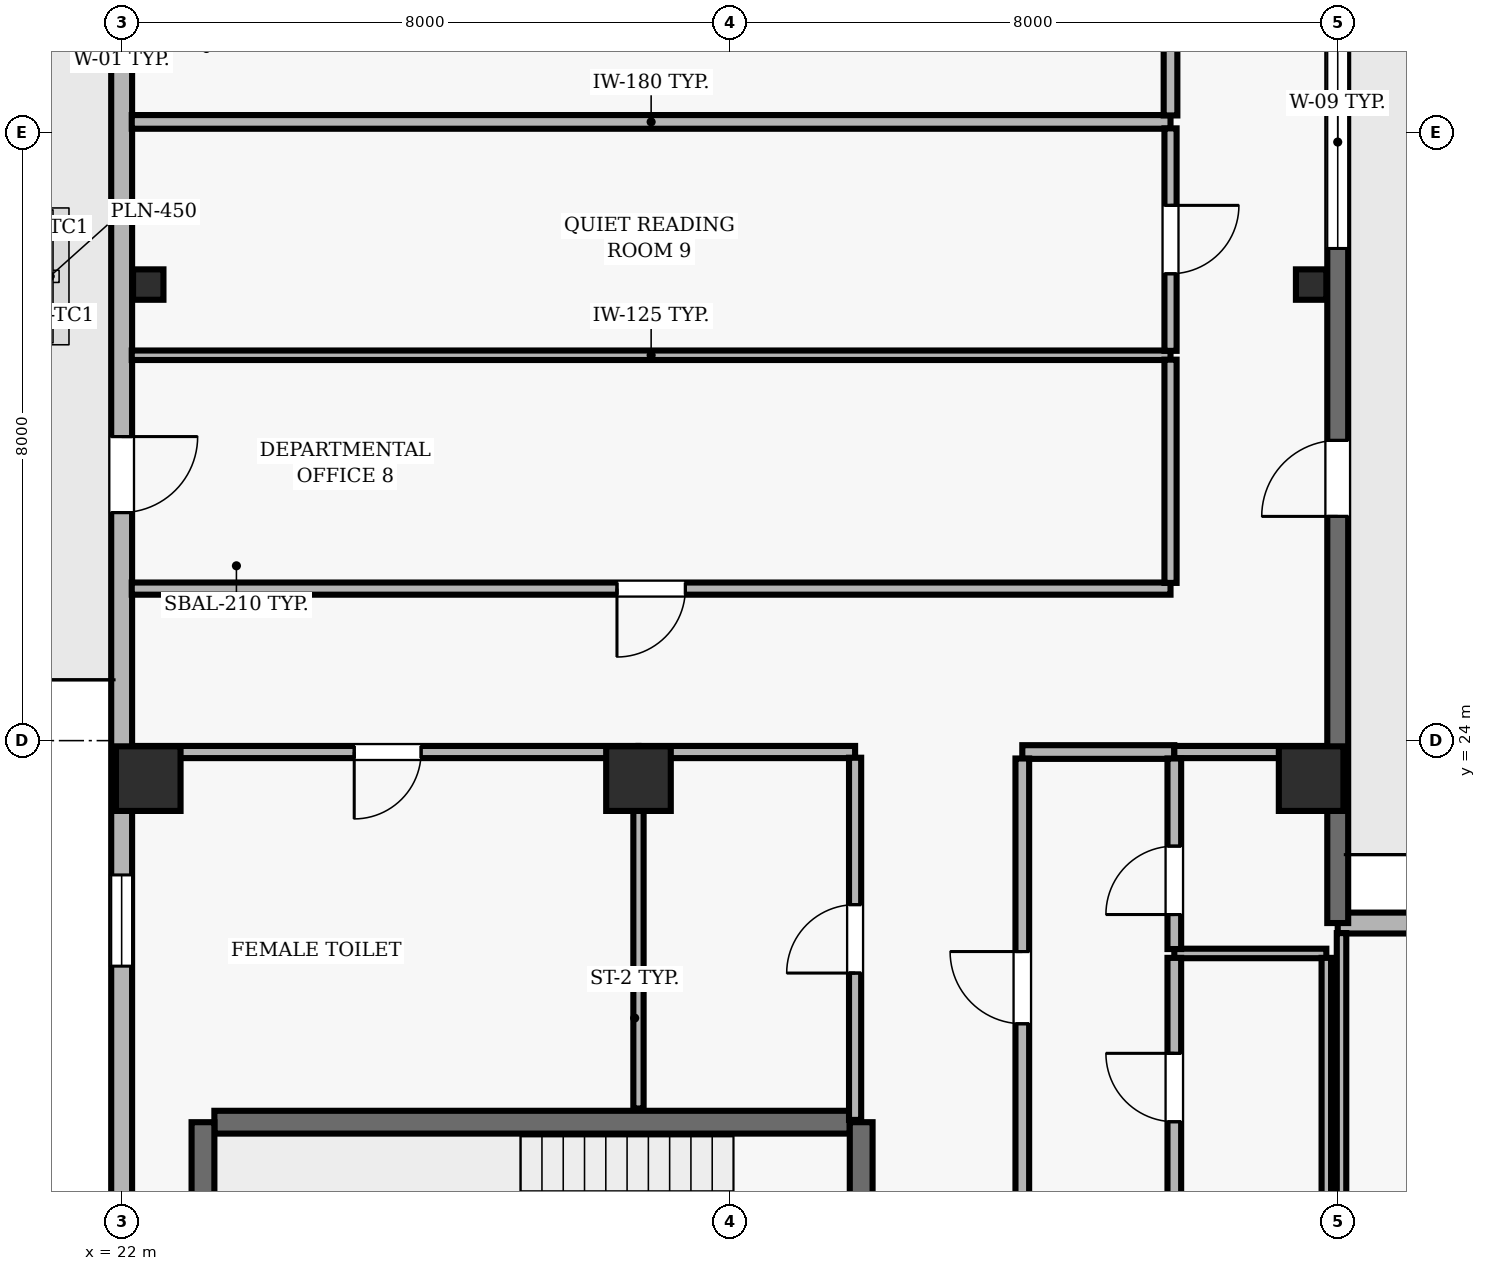
"""IFC4 building model, lengths in metres.
Left out: names, types, materials, properties, quantities, classifications, styles, units other than length and angle.
Written with IfcOpenShell. Run it as: python <this file> out.ifc"""

import sys

from ifc_helpers import new_model, si_unit, direction, frame, frame_2d, origin, origin_2d, place, context, subcontext, project, spatial, rectangle, hollow_rectangle, extrude, element, fill, save


model = new_model("IFC4")
c1 = context("Model", 3, precision=1e-05, world=origin(), true_north=direction((0.0, 1.0)))
c2 = subcontext(c1, "Body", "Model", "MODEL_VIEW")
j1 = project(units=[si_unit("LENGTHUNIT", "METRE"), si_unit("PLANEANGLEUNIT", "RADIAN")], contexts=[c1])
p1 = place(None, origin())
s1 = spatial("IfcSite", under=j1, at=p1, CompositionType="ELEMENT")
p2 = place(p1, origin())
s2 = spatial("IfcBuilding", under=s1, at=p2, CompositionType="ELEMENT")
p3 = place(p2, frame((0.0, 0.0, 295.0)))
s3 = spatial("IfcBuildingStorey", under=s2, at=p3, CompositionType="ELEMENT", Elevation=295.0)
for number, where, z_axis, x_axis in (
    (1, (22.35, 23.5, 0.0), (0.0, 0.0, 1.0), (1.0, 0.0, 0.0)),
    (2, (28.8, 23.5, 0.0), (0.0, 0.0, 1.0), (1.0, 0.0, 0.0)),
    (3, (37.65, 23.5, 0.0), (0.0, 0.0, 1.0), (1.0, 0.0, 0.0)),
):
    element("IfcColumn", number, at=place(p3, frame(where, z_axis=z_axis, x_axis=x_axis)), inside=s3, PredefinedType="COLUMN", context=c2, shape_type="SweptSolid", body=[
        extrude(rectangle(XDim=0.85, YDim=0.85, at=origin_2d()), origin(), (0.0, 0.0, 1.0), 3.9),
    ])
for number, where, z_axis, x_axis in (
    (4, (22.35, 30.0, 0.0), (0.0, 0.0, 1.0), (1.0, 0.0, 0.0)),
    (5, (37.65, 30.0, 0.0), (0.0, 0.0, 1.0), (1.0, 0.0, 0.0)),
):
    element("IfcColumn", number, at=place(p3, frame(where, z_axis=z_axis, x_axis=x_axis)), inside=s3, PredefinedType="COLUMN", context=c2, shape_type="SweptSolid", body=[
        extrude(hollow_rectangle(XDim=0.4, YDim=0.4, WallThickness=0.02, at=origin_2d()), origin(), (0.0, 0.0, 1.0), 3.9),
    ])
p4 = place(p3, frame((43.0, 21.6, 0.0), z_axis=(0.0, 0.0, 1.0), x_axis=(-1.0, 0.0, 0.0)))
e6 = element("IfcWall", 6, at=p4, inside=s3, PredefinedType="SOLIDWALL", context=c2, shape_type="SweptSolid", body=[
    extrude(rectangle(XDim=5.0, YDim=0.275, at=frame_2d((2.5, 0.0))), origin(), (0.0, 0.0, 1.0), 3.69),
])
p5 = place(p3, frame((38.0, 21.6, 0.0), z_axis=(0.0, 0.0, 1.0), x_axis=(0.0, 1.0, 0.0)))
e7 = element("IfcWall", 7, at=p5, inside=s3, PredefinedType="SOLIDWALL", context=c2, shape_type="SweptSolid", body=[
    extrude(rectangle(XDim=13.7, YDim=0.275, at=frame_2d((6.85, 0.0))), origin(), (0.0, 0.0, 1.0), 3.69),
])
p6 = place(p5, frame((5.35, 0.0, 0.0)))
e8 = element("IfcOpeningElement", 8, at=p6, cuts=e7, PredefinedType="OPENING", context=c2, shape_type="SweptSolid", body=[
    extrude(rectangle(XDim=1.0, YDim=2.2, at=frame_2d((0.5, 1.1))), frame((0.0, 0.147, 0.0), z_axis=(0.0, -1.0, 0.0), x_axis=(1.0, 0.0, 0.0)), (0.0, 0.0, 1.0), 0.295),
])
p7 = place(p5, frame((8.875, 0.0, 0.9)))
e9 = element("IfcOpeningElement", 9, at=p7, cuts=e7, PredefinedType="OPENING", context=c2, shape_type="SweptSolid", body=[
    extrude(rectangle(XDim=2.8, YDim=1.8, at=frame_2d((1.4, 0.9))), frame((0.0, 0.147, 0.0), z_axis=(0.0, -1.0, 0.0), x_axis=(1.0, 0.0, 0.0)), (0.0, 0.0, 1.0), 0.295),
])
p8 = place(p3, frame((22.0, 35.3, 0.0), z_axis=(0.0, 0.0, 1.0), x_axis=(0.0, -1.0, 0.0)))
e10 = element("IfcWall", 10, at=p8, inside=s3, PredefinedType="SOLIDWALL", context=c2, shape_type="SweptSolid", body=[
    extrude(rectangle(XDim=32.8, YDim=0.275, at=frame_2d((16.4, 0.0))), origin(), (0.0, 0.0, 1.0), 3.69),
])
p9 = place(p8, frame((7.3, 0.0, 0.0)))
e11 = element("IfcOpeningElement", 11, at=p9, cuts=e10, PredefinedType="OPENING", context=c2, shape_type="SweptSolid", body=[
    extrude(rectangle(XDim=1.0, YDim=2.2, at=frame_2d((0.5, 1.1))), frame((0.0, 0.147, 0.0), z_axis=(0.0, -1.0, 0.0), x_axis=(1.0, 0.0, 0.0)), (0.0, 0.0, 1.0), 0.295),
])
p10 = place(p8, frame((1.233, 0.0, 0.9)))
e12 = element("IfcOpeningElement", 12, at=p10, cuts=e10, PredefinedType="OPENING", context=c2, shape_type="SweptSolid", body=[
    extrude(rectangle(XDim=1.2, YDim=1.6, at=frame_2d((0.6, 0.8))), frame((0.0, 0.147, 0.0), z_axis=(0.0, -1.0, 0.0), x_axis=(1.0, 0.0, 0.0)), (0.0, 0.0, 1.0), 0.295),
])
p11 = place(p8, frame((13.067, 0.0, 0.9)))
e13 = element("IfcOpeningElement", 13, at=p11, cuts=e10, PredefinedType="OPENING", context=c2, shape_type="SweptSolid", body=[
    extrude(rectangle(XDim=1.2, YDim=1.6, at=frame_2d((0.6, 0.8))), frame((0.0, 0.147, 0.0), z_axis=(0.0, -1.0, 0.0), x_axis=(1.0, 0.0, 0.0)), (0.0, 0.0, 1.0), 0.295),
])
p12 = place(p8, frame((18.533, 0.0, 0.9)))
e14 = element("IfcOpeningElement", 14, at=p12, cuts=e10, PredefinedType="OPENING", context=c2, shape_type="SweptSolid", body=[
    extrude(rectangle(XDim=1.2, YDim=1.6, at=frame_2d((0.6, 0.8))), frame((0.0, 0.147, 0.0), z_axis=(0.0, -1.0, 0.0), x_axis=(1.0, 0.0, 0.0)), (0.0, 0.0, 1.0), 0.295),
])
p13 = place(p8, frame((24.0, 0.0, 0.9)))
e15 = element("IfcOpeningElement", 15, at=p13, cuts=e10, PredefinedType="OPENING", context=c2, shape_type="SweptSolid", body=[
    extrude(rectangle(XDim=1.2, YDim=1.6, at=frame_2d((0.6, 0.8))), frame((0.0, 0.147, 0.0), z_axis=(0.0, -1.0, 0.0), x_axis=(1.0, 0.0, 0.0)), (0.0, 0.0, 1.0), 0.295),
])
p14 = place(p8, frame((28.567, 0.0, 0.9)))
e16 = element("IfcOpeningElement", 16, at=p14, cuts=e10, PredefinedType="OPENING", context=c2, shape_type="SweptSolid", body=[
    extrude(rectangle(XDim=1.2, YDim=1.6, at=frame_2d((0.6, 0.8))), frame((0.0, 0.147, 0.0), z_axis=(0.0, -1.0, 0.0), x_axis=(1.0, 0.0, 0.0)), (0.0, 0.0, 1.0), 0.295),
])
p15 = place(p3, frame((31.58, 18.98, 0.0), z_axis=(0.0, 0.0, 1.0), x_axis=(-1.0, 0.0, 0.0)))
e17 = element("IfcWall", 17, at=p15, inside=s3, PredefinedType="SHEAR", context=c2, shape_type="SweptSolid", body=[
    extrude(rectangle(XDim=8.36, YDim=0.3, at=frame_2d((4.18, 0.0))), origin(), (0.0, 0.0, 1.0), 3.69),
])
p16 = place(p3, frame((23.07, 18.98, 0.0), z_axis=(0.0, 0.0, 1.0), x_axis=(0.0, -1.0, 0.0)))
e18 = element("IfcWall", 18, at=p16, inside=s3, PredefinedType="SHEAR", context=c2, shape_type="SweptSolid", body=[
    extrude(rectangle(XDim=3.51, YDim=0.3, at=frame_2d((1.755, 0.0))), origin(), (0.0, 0.0, 1.0), 3.69),
])
p17 = place(p3, frame((31.73, 15.47, 0.0), z_axis=(0.0, 0.0, 1.0), x_axis=(0.0, 1.0, 0.0)))
e19 = element("IfcWall", 19, at=p17, inside=s3, PredefinedType="SHEAR", context=c2, shape_type="SweptSolid", body=[
    extrude(rectangle(XDim=3.51, YDim=0.3, at=frame_2d((1.755, 0.0))), origin(), (0.0, 0.0, 1.0), 3.69),
])
p18 = place(p17, frame((1.18, 0.0, 0.0)))
e20 = element("IfcOpeningElement", 20, at=p18, cuts=e19, PredefinedType="OPENING", context=c2, shape_type="SweptSolid", body=[
    extrude(rectangle(XDim=1.15, YDim=2.15, at=frame_2d((0.575, 1.075))), frame((0.0, 0.16, 0.0), z_axis=(0.0, -1.0, 0.0), x_axis=(1.0, 0.0, 0.0)), (0.0, 0.0, 1.0), 0.32),
])
p19 = place(p3, frame((28.8, 23.85, 0.0), z_axis=(0.0, 0.0, 1.0), x_axis=(-1.0, 0.0, 0.0)))
e21 = element("IfcWall", 21, at=p19, inside=s3, PredefinedType="PARTITIONING", context=c2, shape_type="SweptSolid", body=[
    extrude(rectangle(XDim=6.6, YDim=0.16, at=frame_2d((3.3, 0.0))), origin(), (0.0, 0.0, 1.0), 3.221),
])
p20 = place(p19, frame((2.86, 0.0, 0.0)))
e22 = element("IfcOpeningElement", 22, at=p20, cuts=e21, PredefinedType="OPENING", context=c2, shape_type="SweptSolid", body=[
    extrude(rectangle(XDim=0.88, YDim=2.1, at=frame_2d((0.44, 1.05))), frame((0.0, 0.09, 0.0), z_axis=(0.0, -1.0, 0.0), x_axis=(1.0, 0.0, 0.0)), (0.0, 0.0, 1.0), 0.18),
])
p21 = place(p3, frame((31.65, 23.85, 0.0), z_axis=(0.0, 0.0, 1.0), x_axis=(-1.0, 0.0, 0.0)))
e23 = element("IfcWall", 23, at=p21, inside=s3, PredefinedType="PARTITIONING", context=c2, shape_type="SweptSolid", body=[
    extrude(rectangle(XDim=2.85, YDim=0.16, at=frame_2d((1.425, 0.0))), origin(), (0.0, 0.0, 1.0), 3.221),
])
p22 = place(p3, frame((35.8, 26.0, 0.0), z_axis=(0.0, 0.0, 1.0), x_axis=(-1.0, 0.0, 0.0)))
e24 = element("IfcWall", 24, at=p22, inside=s3, PredefinedType="PARTITIONING", context=c2, shape_type="SweptSolid", body=[
    extrude(rectangle(XDim=13.667, YDim=0.16, at=frame_2d((6.833, 0.0))), origin(), (0.0, 0.0, 1.0), 3.69),
])
p23 = place(p22, frame((6.383, 0.0, 0.0)))
e25 = element("IfcOpeningElement", 25, at=p23, cuts=e24, PredefinedType="OPENING", context=c2, shape_type="SweptSolid", body=[
    extrude(rectangle(XDim=0.9, YDim=2.1, at=frame_2d((0.45, 1.05))), frame((0.0, 0.09, 0.0), z_axis=(0.0, -1.0, 0.0), x_axis=(1.0, 0.0, 0.0)), (0.0, 0.0, 1.0), 0.18),
])
p24 = place(p3, frame((35.8, 29.07, 0.0), z_axis=(0.0, 0.0, 1.0), x_axis=(-1.0, 0.0, 0.0)))
e26 = element("IfcWall", 26, at=p24, inside=s3, PredefinedType="PARTITIONING", context=c2, shape_type="SweptSolid", body=[
    extrude(rectangle(XDim=13.667, YDim=0.125, at=frame_2d((6.833, 0.0))), origin(), (0.0, 0.0, 1.0), 3.69),
])
p25 = place(p3, frame((35.8, 32.14, 0.0), z_axis=(0.0, 0.0, 1.0), x_axis=(-1.0, 0.0, 0.0)))
e27 = element("IfcWall", 27, at=p25, inside=s3, PredefinedType="PARTITIONING", context=c2, shape_type="SweptSolid", body=[
    extrude(rectangle(XDim=13.667, YDim=0.18, at=frame_2d((6.833, 0.0))), origin(), (0.0, 0.0, 1.0), 3.69),
])
p26 = place(p3, frame((35.85, 21.2, 0.0), z_axis=(0.0, 0.0, 1.0), x_axis=(1.0, 0.0, 0.0)))
e28 = element("IfcWall", 28, at=p26, inside=s3, PredefinedType="PARTITIONING", context=c2, shape_type="SweptSolid", body=[
    extrude(rectangle(XDim=2.0, YDim=0.125, at=frame_2d((1.0, 0.0))), origin(), (0.0, 0.0, 1.0), 3.69),
])
p27 = place(p3, frame((35.85, 23.85, 0.0), z_axis=(0.0, 0.0, 1.0), x_axis=(-1.0, 0.0, 0.0)))
e29 = element("IfcWall", 29, at=p27, inside=s3, PredefinedType="PARTITIONING", context=c2, shape_type="SweptSolid", body=[
    extrude(rectangle(XDim=2.0, YDim=0.18, at=frame_2d((1.0, 0.0))), origin(), (0.0, 0.0, 1.0), 3.221),
])
p28 = place(p3, frame((37.85, 23.85, 0.0), z_axis=(0.0, 0.0, 1.0), x_axis=(-1.0, 0.0, 0.0)))
e30 = element("IfcWall", 30, at=p28, inside=s3, PredefinedType="PARTITIONING", context=c2, shape_type="SweptSolid", body=[
    extrude(rectangle(XDim=2.0, YDim=0.16, at=frame_2d((1.0, 0.0))), origin(), (0.0, 0.0, 1.0), 3.221),
])
p29 = place(p3, frame((28.8, 23.775, 0.0), z_axis=(0.0, 0.0, 1.0), x_axis=(0.0, -1.0, 0.0)))
e31 = element("IfcWall", 31, at=p29, inside=s3, PredefinedType="PARTITIONING", context=c2, shape_type="SweptSolid", body=[
    extrude(rectangle(XDim=4.615, YDim=0.135, at=frame_2d((2.308, 0.0))), origin(), (0.0, 0.0, 1.0), 3.69),
])
p30 = place(p3, frame((31.65, 19.01, 0.0), z_axis=(0.0, 0.0, 1.0), x_axis=(0.0, 1.0, 0.0)))
e32 = element("IfcWall", 32, at=p30, inside=s3, PredefinedType="PARTITIONING", context=c2, shape_type="SweptSolid", body=[
    extrude(rectangle(XDim=4.765, YDim=0.16, at=frame_2d((2.382, 0.0))), origin(), (0.0, 0.0, 1.0), 3.69),
])
p31 = place(p30, frame((1.932, 0.0, 0.0)))
e33 = element("IfcOpeningElement", 33, at=p31, cuts=e32, PredefinedType="OPENING", context=c2, shape_type="SweptSolid", body=[
    extrude(rectangle(XDim=0.9, YDim=2.1, at=frame_2d((0.45, 1.05))), frame((0.0, 0.09, 0.0), z_axis=(0.0, -1.0, 0.0), x_axis=(1.0, 0.0, 0.0)), (0.0, 0.0, 1.0), 0.18),
])
p32 = place(p3, frame((33.85, 17.735, 0.0), z_axis=(0.0, 0.0, 1.0), x_axis=(0.0, 1.0, 0.0)))
e34 = element("IfcWall", 34, at=p32, inside=s3, PredefinedType="PARTITIONING", context=c2, shape_type="SweptSolid", body=[
    extrude(rectangle(XDim=6.03, YDim=0.18, at=frame_2d((3.015, 0.0))), origin(), (0.0, 0.0, 1.0), 3.69),
])
p33 = place(p32, frame((2.54, 0.0, 0.0)))
e35 = element("IfcOpeningElement", 35, at=p33, cuts=e34, PredefinedType="OPENING", context=c2, shape_type="SweptSolid", body=[
    extrude(rectangle(XDim=0.95, YDim=2.1, at=frame_2d((0.475, 1.05))), frame((0.0, 0.1, 0.0), z_axis=(0.0, -1.0, 0.0), x_axis=(1.0, 0.0, 0.0)), (0.0, 0.0, 1.0), 0.2),
])
p34 = place(p3, frame((35.8, 29.012, 0.0), z_axis=(0.0, 0.0, 1.0), x_axis=(0.0, -1.0, 0.0)))
e36 = element("IfcWall", 36, at=p34, inside=s3, PredefinedType="PARTITIONING", context=c2, shape_type="SweptSolid", body=[
    extrude(rectangle(XDim=2.937, YDim=0.16, at=frame_2d((1.469, 0.0))), origin(), (0.0, 0.0, 1.0), 3.69),
])
p35 = place(p3, frame((35.8, 32.055, 0.0), z_axis=(0.0, 0.0, 1.0), x_axis=(0.0, -1.0, 0.0)))
e37 = element("IfcWall", 37, at=p35, inside=s3, PredefinedType="PARTITIONING", context=c2, shape_type="SweptSolid", body=[
    extrude(rectangle(XDim=2.927, YDim=0.16, at=frame_2d((1.463, 0.0))), origin(), (0.0, 0.0, 1.0), 3.69),
])
p36 = place(p35, frame((1.013, 0.0, 0.0)))
e38 = element("IfcOpeningElement", 38, at=p36, cuts=e37, PredefinedType="OPENING", context=c2, shape_type="SweptSolid", body=[
    extrude(rectangle(XDim=0.9, YDim=2.1, at=frame_2d((0.45, 1.05))), frame((0.0, 0.09, 0.0), z_axis=(0.0, -1.0, 0.0), x_axis=(1.0, 0.0, 0.0)), (0.0, 0.0, 1.0), 0.18),
])
p37 = place(p3, frame((35.8, 37.313, 0.0), z_axis=(0.0, 0.0, 1.0), x_axis=(0.0, -1.0, 0.0)))
e39 = element("IfcWall", 39, at=p37, inside=s3, PredefinedType="PARTITIONING", context=c2, shape_type="SweptSolid", body=[
    extrude(rectangle(XDim=5.088, YDim=0.18, at=frame_2d((2.544, 0.0))), origin(), (0.0, 0.0, 1.0), 3.69),
])
p38 = place(p37, frame((2.069, 0.0, 0.0)))
e40 = element("IfcOpeningElement", 40, at=p38, cuts=e39, PredefinedType="OPENING", context=c2, shape_type="SweptSolid", body=[
    extrude(rectangle(XDim=0.95, YDim=2.1, at=frame_2d((0.475, 1.05))), frame((0.0, 0.1, 0.0), z_axis=(0.0, -1.0, 0.0), x_axis=(1.0, 0.0, 0.0)), (0.0, 0.0, 1.0), 0.2),
])
p39 = place(p3, frame((35.85, 17.73, 0.0), z_axis=(0.0, 0.0, 1.0), x_axis=(0.0, 1.0, 0.0)))
e41 = element("IfcWall", 41, at=p39, inside=s3, PredefinedType="PARTITIONING", context=c2, shape_type="SweptSolid", body=[
    extrude(rectangle(XDim=3.412, YDim=0.18, at=frame_2d((1.706, 0.0))), origin(), (0.0, 0.0, 1.0), 3.69),
])
p40 = place(p39, frame((1.256, 0.0, 0.0)))
e42 = element("IfcOpeningElement", 42, at=p40, cuts=e41, PredefinedType="OPENING", context=c2, shape_type="SweptSolid", body=[
    extrude(rectangle(XDim=0.9, YDim=2.1, at=frame_2d((0.45, 1.05))), frame((0.0, 0.1, 0.0), z_axis=(0.0, -1.0, 0.0), x_axis=(1.0, 0.0, 0.0)), (0.0, 0.0, 1.0), 0.2),
])
p41 = place(p3, frame((35.85, 21.258, 0.0), z_axis=(0.0, 0.0, 1.0), x_axis=(0.0, 1.0, 0.0)))
e43 = element("IfcWall", 43, at=p41, inside=s3, PredefinedType="PARTITIONING", context=c2, shape_type="SweptSolid", body=[
    extrude(rectangle(XDim=2.507, YDim=0.18, at=frame_2d((1.253, 0.0))), origin(), (0.0, 0.0, 1.0), 3.69),
])
p42 = place(p41, frame((0.454, 0.0, 0.0)))
e44 = element("IfcOpeningElement", 44, at=p42, cuts=e43, PredefinedType="OPENING", context=c2, shape_type="SweptSolid", body=[
    extrude(rectangle(XDim=0.9, YDim=2.1, at=frame_2d((0.45, 1.05))), frame((0.0, 0.1, 0.0), z_axis=(0.0, -1.0, 0.0), x_axis=(1.0, 0.0, 0.0)), (0.0, 0.0, 1.0), 0.2),
])
p43 = place(p3, frame((37.85, 17.65, 0.0), z_axis=(0.0, 0.0, 1.0), x_axis=(0.0, 1.0, 0.0)))
e45 = element("IfcWall", 45, at=p43, inside=s3, PredefinedType="PARTITIONING", context=c2, shape_type="SweptSolid", body=[
    extrude(rectangle(XDim=3.492, YDim=0.125, at=frame_2d((1.746, 0.0))), origin(), (0.0, 0.0, 1.0), 3.221),
])
p44 = place(p3, frame((38.05, 21.468, 0.0), z_axis=(0.0, 0.0, 1.0), x_axis=(0.0, -1.0, 0.0)))
e46 = element("IfcWall", 46, at=p44, inside=s3, PredefinedType="PARTITIONING", context=c2, shape_type="SweptSolid", body=[
    extrude(rectangle(XDim=5.393, YDim=0.125, at=frame_2d((2.697, 0.0))), origin(), (0.0, 0.0, 1.0), 3.221),
])
p45 = place(p6, origin())
e47 = element("IfcDoor", 47, at=p45, inside=s3, OperationType="SINGLE_SWING_LEFT", PredefinedType="DOOR", context=c2, shape_type="SweptSolid", body=[
    extrude(rectangle(XDim=1.0, YDim=2.2, at=frame_2d((0.5, 1.1))), frame((0.0, 0.025, 0.0), z_axis=(0.0, -1.0, 0.0), x_axis=(1.0, 0.0, 0.0)), (0.0, 0.0, 1.0), 0.05),
])
fill(e8, e47)
p46 = place(p7, origin())
e48 = element("IfcWindow", 48, at=p46, inside=s3, PartitioningType="SINGLE_PANEL", PredefinedType="WINDOW", context=c2, shape_type="SweptSolid", body=[
    extrude(rectangle(XDim=2.8, YDim=1.8, at=frame_2d((1.4, 0.9))), frame((0.0, 0.03, 0.0), z_axis=(0.0, -1.0, 0.0), x_axis=(1.0, 0.0, 0.0)), (0.0, 0.0, 1.0), 0.06),
])
fill(e9, e48)
p47 = place(p9, origin())
e49 = element("IfcDoor", 49, at=p47, inside=s3, OperationType="SINGLE_SWING_LEFT", PredefinedType="DOOR", context=c2, shape_type="SweptSolid", body=[
    extrude(rectangle(XDim=1.0, YDim=2.2, at=frame_2d((0.5, 1.1))), frame((0.0, 0.025, 0.0), z_axis=(0.0, -1.0, 0.0), x_axis=(1.0, 0.0, 0.0)), (0.0, 0.0, 1.0), 0.05),
])
fill(e11, e49)
p48 = place(p10, origin())
e50 = element("IfcWindow", 50, at=p48, inside=s3, PartitioningType="SINGLE_PANEL", PredefinedType="WINDOW", context=c2, shape_type="SweptSolid", body=[
    extrude(rectangle(XDim=1.2, YDim=1.6, at=frame_2d((0.6, 0.8))), frame((0.0, 0.03, 0.0), z_axis=(0.0, -1.0, 0.0), x_axis=(1.0, 0.0, 0.0)), (0.0, 0.0, 1.0), 0.06),
])
fill(e12, e50)
p49 = place(p11, origin())
e51 = element("IfcWindow", 51, at=p49, inside=s3, PartitioningType="SINGLE_PANEL", PredefinedType="WINDOW", context=c2, shape_type="SweptSolid", body=[
    extrude(rectangle(XDim=1.2, YDim=1.6, at=frame_2d((0.6, 0.8))), frame((0.0, 0.03, 0.0), z_axis=(0.0, -1.0, 0.0), x_axis=(1.0, 0.0, 0.0)), (0.0, 0.0, 1.0), 0.06),
])
fill(e13, e51)
p50 = place(p33, origin())
e52 = element("IfcDoor", 52, at=p50, inside=s3, OperationType="SINGLE_SWING_RIGHT", PredefinedType="DOOR", context=c2, shape_type="SweptSolid", body=[
    extrude(rectangle(XDim=0.95, YDim=2.1, at=frame_2d((0.475, 1.05))), frame((0.0, 0.025, 0.0), z_axis=(0.0, -1.0, 0.0), x_axis=(1.0, 0.0, 0.0)), (0.0, 0.0, 1.0), 0.05),
])
fill(e35, e52)
p51 = place(p42, origin())
e53 = element("IfcDoor", 53, at=p51, inside=s3, OperationType="SINGLE_SWING_LEFT", PredefinedType="DOOR", context=c2, shape_type="SweptSolid", body=[
    extrude(rectangle(XDim=0.9, YDim=2.1, at=frame_2d((0.45, 1.05))), frame((0.0, 0.025, 0.0), z_axis=(0.0, -1.0, 0.0), x_axis=(1.0, 0.0, 0.0)), (0.0, 0.0, 1.0), 0.05),
])
fill(e44, e53)
p52 = place(p40, origin())
e54 = element("IfcDoor", 54, at=p52, inside=s3, OperationType="SINGLE_SWING_RIGHT", PredefinedType="DOOR", context=c2, shape_type="SweptSolid", body=[
    extrude(rectangle(XDim=0.9, YDim=2.1, at=frame_2d((0.45, 1.05))), frame((0.0, 0.025, 0.0), z_axis=(0.0, -1.0, 0.0), x_axis=(1.0, 0.0, 0.0)), (0.0, 0.0, 1.0), 0.05),
])
fill(e42, e54)
p53 = place(p31, origin())
e55 = element("IfcDoor", 55, at=p53, inside=s3, OperationType="SINGLE_SWING_LEFT", PredefinedType="DOOR", context=c2, shape_type="SweptSolid", body=[
    extrude(rectangle(XDim=0.9, YDim=2.1, at=frame_2d((0.45, 1.05))), frame((0.0, 0.025, 0.0), z_axis=(0.0, -1.0, 0.0), x_axis=(1.0, 0.0, 0.0)), (0.0, 0.0, 1.0), 0.05),
])
fill(e33, e55)
p54 = place(p20, origin())
e56 = element("IfcDoor", 56, at=p54, inside=s3, OperationType="SINGLE_SWING_RIGHT", PredefinedType="DOOR", context=c2, shape_type="SweptSolid", body=[
    extrude(rectangle(XDim=0.88, YDim=2.1, at=frame_2d((0.44, 1.05))), frame((0.0, 0.025, 0.0), z_axis=(0.0, -1.0, 0.0), x_axis=(1.0, 0.0, 0.0)), (0.0, 0.0, 1.0), 0.05),
])
fill(e22, e56)
p55 = place(p23, origin())
e57 = element("IfcDoor", 57, at=p55, inside=s3, OperationType="SINGLE_SWING_RIGHT", PredefinedType="DOOR", context=c2, shape_type="SweptSolid", body=[
    extrude(rectangle(XDim=0.9, YDim=2.1, at=frame_2d((0.45, 1.05))), frame((0.0, 0.025, 0.0), z_axis=(0.0, -1.0, 0.0), x_axis=(1.0, 0.0, 0.0)), (0.0, 0.0, 1.0), 0.05),
])
fill(e25, e57)
p56 = place(p36, origin())
e58 = element("IfcDoor", 58, at=p56, inside=s3, OperationType="SINGLE_SWING_LEFT", PredefinedType="DOOR", context=c2, shape_type="SweptSolid", body=[
    extrude(rectangle(XDim=0.9, YDim=2.1, at=frame_2d((0.45, 1.05))), frame((0.0, 0.025, 0.0), z_axis=(0.0, -1.0, 0.0), x_axis=(1.0, 0.0, 0.0)), (0.0, 0.0, 1.0), 0.05),
])
fill(e38, e58)
save(model, sys.argv[1])
